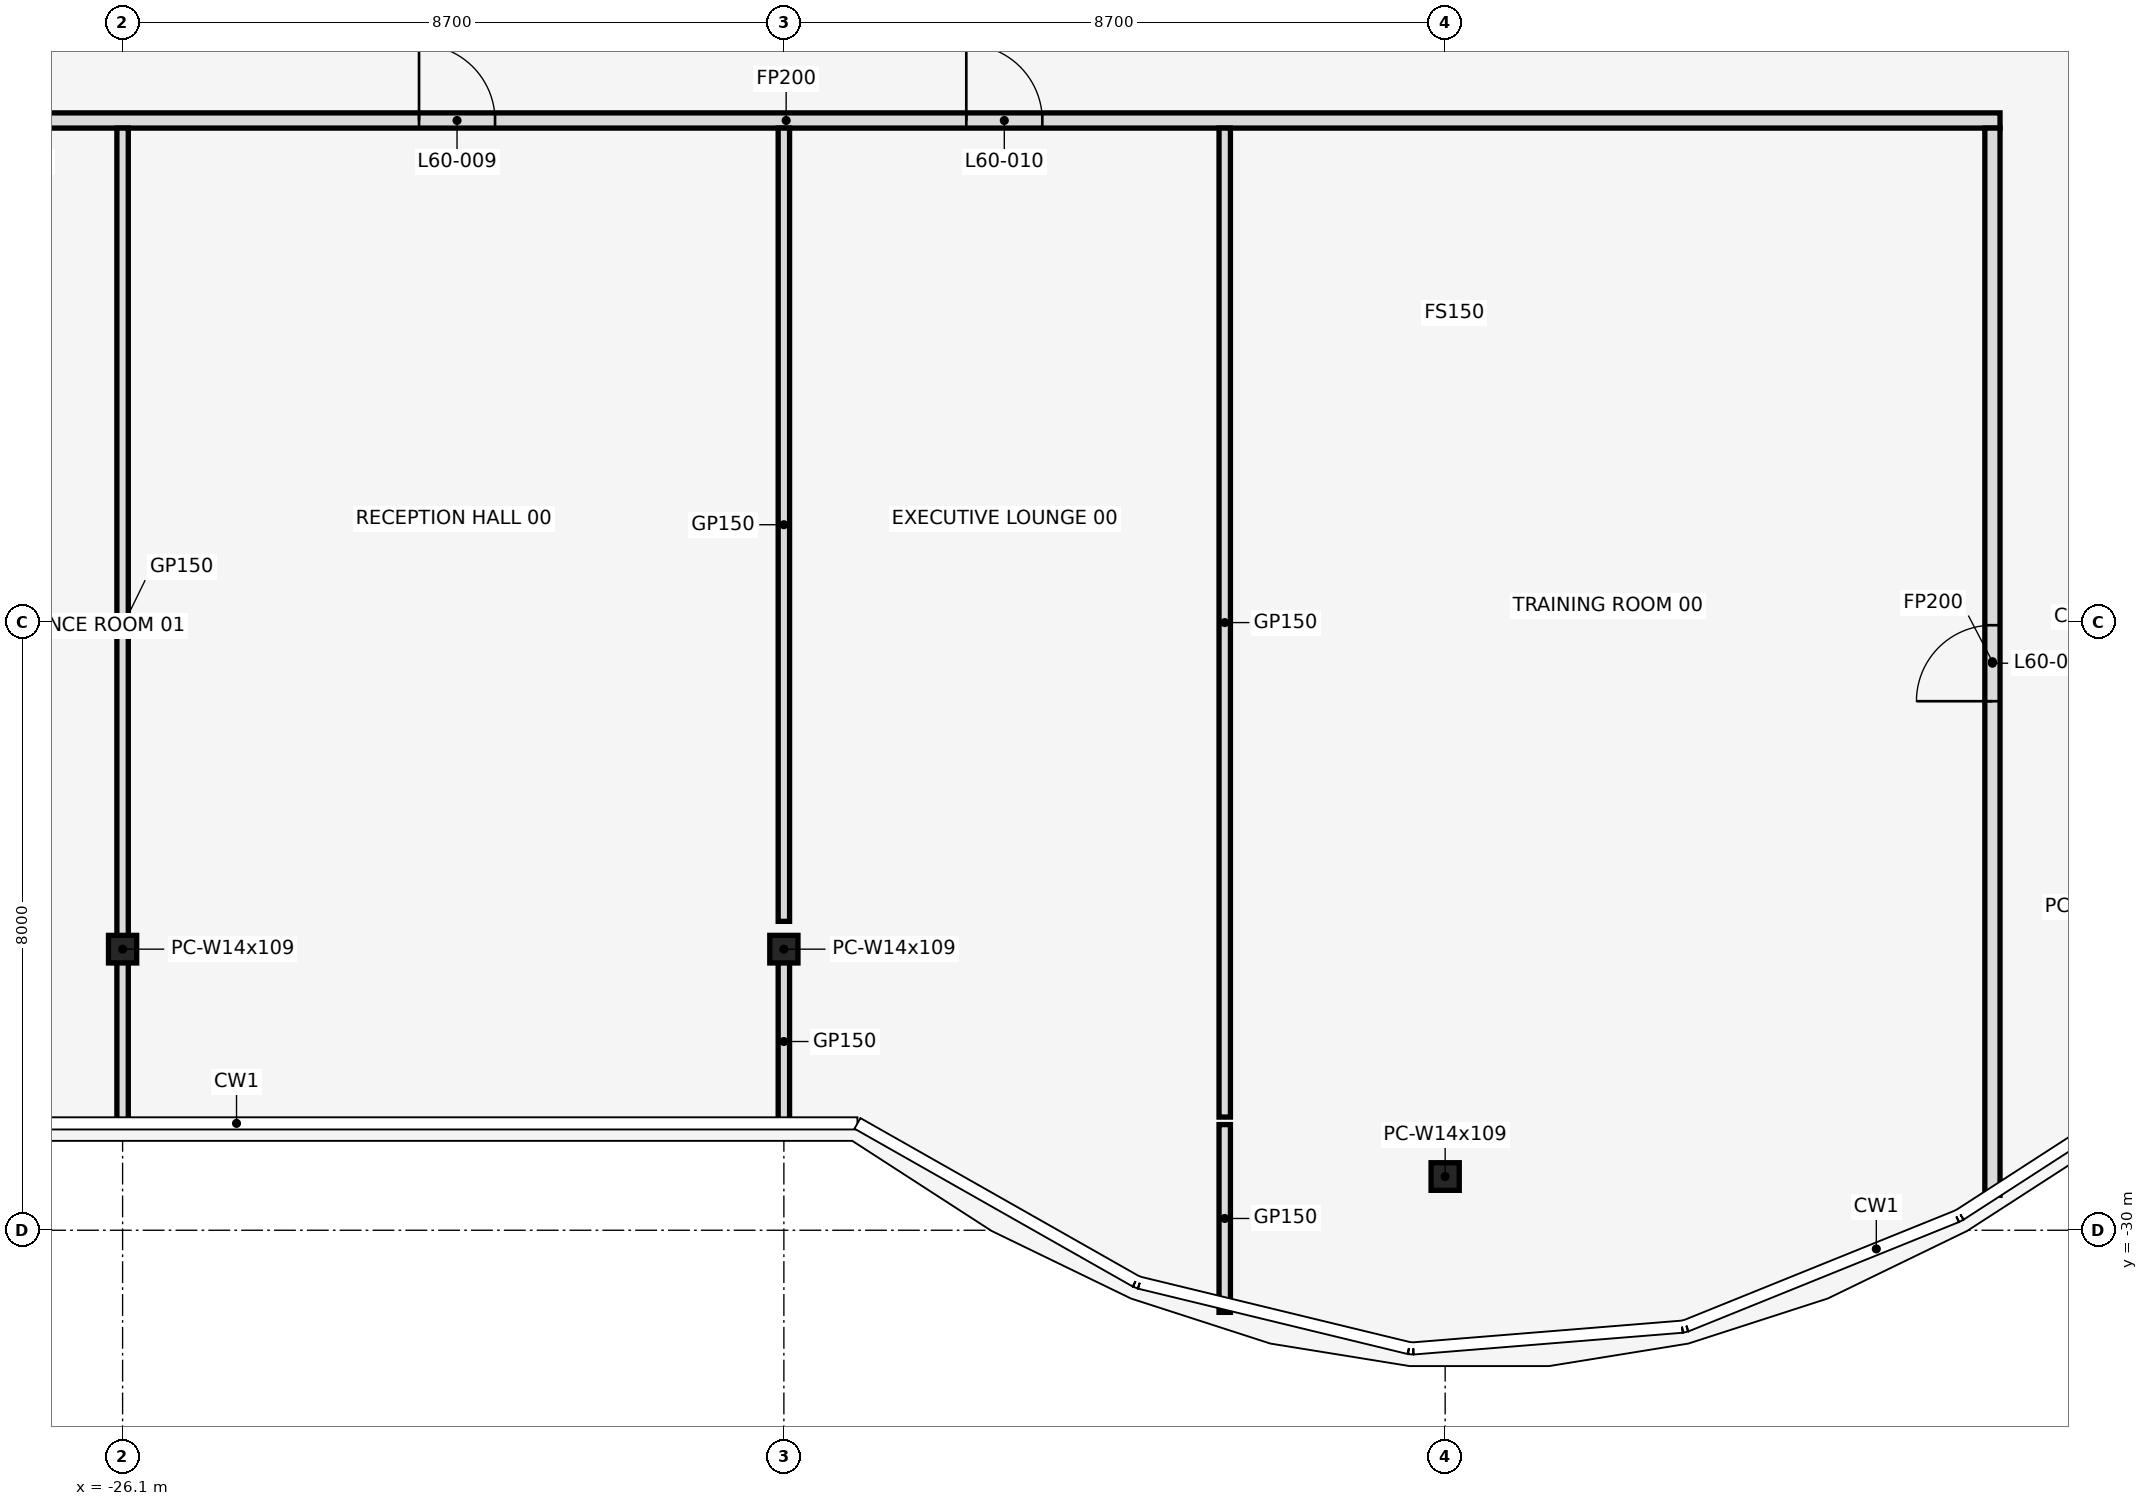
"""IFC4 building model, lengths in metres.
Left out: names, types, materials, properties, quantities, classifications, styles, units other than length and angle.
Written with IfcOpenShell. Run it as: python <this file> out.ifc"""

import sys

from ifc_helpers import new_model, si_unit, direction, frame, frame_2d, origin, origin_2d, place, context, subcontext, project, spatial, rectangle, i_section, extrude, element, fill, save


model = new_model("IFC4")
c1 = context("Model", 3, precision=1e-05, world=origin(), true_north=direction((0.0, 1.0)))
c2 = subcontext(c1, "Body", "Model", "MODEL_VIEW")
j1 = project(units=[si_unit("LENGTHUNIT", "METRE"), si_unit("PLANEANGLEUNIT", "RADIAN")], contexts=[c1])
p1 = place(None, origin())
s1 = spatial("IfcSite", under=j1, at=p1, CompositionType="ELEMENT")
p2 = place(p1, origin())
s2 = spatial("IfcBuilding", under=s1, at=p2, CompositionType="ELEMENT")
p3 = place(p2, frame((0.0, 0.0, 266.6)))
s3 = spatial("IfcBuildingStorey", under=s2, at=p3, CompositionType="ELEMENT", Elevation=266.6)
for number, where, z_axis, x_axis in (
    (1, (-26.1, -26.302, 0.0), (0.0, 0.0, 1.0), (1.0, 0.0, 0.0)),
    (2, (-17.4, -26.302, 0.0), (0.0, 0.0, 1.0), (1.0, 0.0, 0.0)),
    (3, (-8.7, -29.293, 0.0), (0.0, 0.0, 1.0), (1.0, 0.0, 0.0)),
):
    element("IfcColumn", number, at=place(p3, frame(where, z_axis=z_axis, x_axis=x_axis)), inside=s3, PredefinedType="COLUMN", context=c2, shape_type="SweptSolid", body=[
        extrude(i_section(OverallWidth=0.371, OverallDepth=0.363, WebThickness=0.013, FlangeThickness=0.022, at=origin_2d()), origin(), (0.0, 0.0, 1.0), 4.2),
    ])
p4 = place(p3, frame((-33.34, -15.4, 0.0), z_axis=(0.0, 0.0, 1.0), x_axis=(1.0, 0.0, 0.0)))
e4 = element("IfcWall", 4, at=p4, inside=s3, PredefinedType="PARTITIONING", context=c2, shape_type="SweptSolid", body=[
    extrude(rectangle(XDim=31.94, YDim=0.2, at=frame_2d((15.97, 0.0))), origin(), (0.0, 0.0, 1.0), 3.118),
])
p5 = place(p4, frame((1.7, 0.0, 0.0)))
e5 = element("IfcOpeningElement", 5, at=p5, cuts=e4, PredefinedType="OPENING", context=c2, shape_type="SweptSolid", body=[
    extrude(rectangle(XDim=1.0, YDim=2.1, at=frame_2d((0.5, 1.05))), frame((0.0, 0.112, 0.0), z_axis=(0.0, -1.0, 0.0), x_axis=(1.0, 0.0, 0.0)), (0.0, 0.0, 1.0), 0.224),
])
p6 = place(p4, frame((5.34, 0.0, 0.0)))
e6 = element("IfcOpeningElement", 6, at=p6, cuts=e4, PredefinedType="OPENING", context=c2, shape_type="SweptSolid", body=[
    extrude(rectangle(XDim=0.9, YDim=2.1, at=frame_2d((0.45, 1.05))), frame((0.0, 0.112, 0.0), z_axis=(0.0, -1.0, 0.0), x_axis=(1.0, 0.0, 0.0)), (0.0, 0.0, 1.0), 0.224),
])
p7 = place(p4, frame((11.14, 0.0, 0.0)))
e7 = element("IfcOpeningElement", 7, at=p7, cuts=e4, PredefinedType="OPENING", context=c2, shape_type="SweptSolid", body=[
    extrude(rectangle(XDim=1.0, YDim=2.1, at=frame_2d((0.5, 1.05))), frame((0.0, 0.112, 0.0), z_axis=(0.0, -1.0, 0.0), x_axis=(1.0, 0.0, 0.0)), (0.0, 0.0, 1.0), 0.224),
])
p8 = place(p4, frame((18.34, 0.0, 0.0)))
e8 = element("IfcOpeningElement", 8, at=p8, cuts=e4, PredefinedType="OPENING", context=c2, shape_type="SweptSolid", body=[
    extrude(rectangle(XDim=1.0, YDim=2.1, at=frame_2d((0.5, 1.05))), frame((0.0, 0.112, 0.0), z_axis=(0.0, -1.0, 0.0), x_axis=(1.0, 0.0, 0.0)), (0.0, 0.0, 1.0), 0.224),
])
p9 = place(p3, frame((-26.1, -28.61, 0.0), z_axis=(0.0, 0.0, 1.0), x_axis=(0.0, 1.0, 0.0)))
e9 = element("IfcWall", 9, at=p9, inside=s3, PredefinedType="PARTITIONING", context=c2, shape_type="SweptSolid", body=[
    extrude(rectangle(XDim=13.11, YDim=0.15, at=frame_2d((6.555, 0.0))), origin(), (0.0, 0.0, 1.0), 3.118),
])
p10 = place(p3, frame((-17.4, -28.61, 0.0), z_axis=(0.0, 0.0, 1.0), x_axis=(0.0, 1.0, 0.0)))
e10 = element("IfcWall", 10, at=p10, inside=s3, PredefinedType="PARTITIONING", context=c2, shape_type="SweptSolid", body=[
    extrude(rectangle(XDim=2.186, YDim=0.15, at=frame_2d((1.093, 0.0))), origin(), (0.0, 0.0, 1.0), 3.118),
])
p11 = place(p3, frame((-17.4, -25.936, 0.0), z_axis=(0.0, 0.0, 1.0), x_axis=(0.0, 1.0, 0.0)))
e11 = element("IfcWall", 11, at=p11, inside=s3, PredefinedType="PARTITIONING", context=c2, shape_type="SweptSolid", body=[
    extrude(rectangle(XDim=10.436, YDim=0.15, at=frame_2d((5.218, 0.0))), origin(), (0.0, 0.0, 1.0), 3.118),
])
p12 = place(p3, frame((-11.6, -31.08, 0.0), z_axis=(0.0, 0.0, 1.0), x_axis=(0.0, 1.0, 0.0)))
e12 = element("IfcWall", 12, at=p12, inside=s3, PredefinedType="PARTITIONING", context=c2, shape_type="SweptSolid", body=[
    extrude(rectangle(XDim=2.47, YDim=0.15, at=frame_2d((1.235, 0.0))), origin(), (0.0, 0.0, 1.0), 3.118),
])
p13 = place(p3, frame((-11.6, -28.511, 0.0), z_axis=(0.0, 0.0, 1.0), x_axis=(0.0, 1.0, 0.0)))
e13 = element("IfcWall", 13, at=p13, inside=s3, PredefinedType="PARTITIONING", context=c2, shape_type="SweptSolid", body=[
    extrude(rectangle(XDim=13.011, YDim=0.15, at=frame_2d((6.505, 0.0))), origin(), (0.0, 0.0, 1.0), 3.118),
])
p14 = place(p3, frame((-1.5, -29.54, 0.0), z_axis=(0.0, 0.0, 1.0), x_axis=(0.0, 1.0, 0.0)))
e14 = element("IfcWall", 14, at=p14, inside=s3, PredefinedType="PARTITIONING", context=c2, shape_type="SweptSolid", body=[
    extrude(rectangle(XDim=14.04, YDim=0.2, at=frame_2d((7.02, 0.0))), origin(), (0.0, 0.0, 1.0), 3.118),
])
p15 = place(p14, frame((6.5, 0.0, 0.0)))
e15 = element("IfcOpeningElement", 15, at=p15, cuts=e14, PredefinedType="OPENING", context=c2, shape_type="SweptSolid", body=[
    extrude(rectangle(XDim=1.0, YDim=2.1, at=frame_2d((0.5, 1.05))), frame((0.0, 0.112, 0.0), z_axis=(0.0, -1.0, 0.0), x_axis=(1.0, 0.0, 0.0)), (0.0, 0.0, 1.0), 0.224),
])
p16 = place(p7, frame((1.0, 0.0, 0.0), z_axis=(0.0, 0.0, 1.0), x_axis=(-1.0, 0.0, 0.0)))
e16 = element("IfcDoor", 16, at=p16, inside=s3, OperationType="SINGLE_SWING_RIGHT", PredefinedType="DOOR", context=c2, shape_type="SweptSolid", body=[
    extrude(rectangle(XDim=1.0, YDim=2.1, at=frame_2d((0.5, 1.05))), frame((0.0, 0.025, 0.0), z_axis=(0.0, -1.0, 0.0), x_axis=(1.0, 0.0, 0.0)), (0.0, 0.0, 1.0), 0.05),
])
fill(e7, e16)
p17 = place(p8, frame((1.0, 0.0, 0.0), z_axis=(0.0, 0.0, 1.0), x_axis=(-1.0, 0.0, 0.0)))
e17 = element("IfcDoor", 17, at=p17, inside=s3, OperationType="SINGLE_SWING_LEFT", PredefinedType="DOOR", context=c2, shape_type="SweptSolid", body=[
    extrude(rectangle(XDim=1.0, YDim=2.1, at=frame_2d((0.5, 1.05))), frame((0.0, 0.025, 0.0), z_axis=(0.0, -1.0, 0.0), x_axis=(1.0, 0.0, 0.0)), (0.0, 0.0, 1.0), 0.05),
])
fill(e8, e17)
p18 = place(p15, origin())
e18 = element("IfcDoor", 18, at=p18, inside=s3, OperationType="SINGLE_SWING_LEFT", PredefinedType="DOOR", context=c2, shape_type="SweptSolid", body=[
    extrude(rectangle(XDim=1.0, YDim=2.1, at=frame_2d((0.5, 1.05))), frame((0.0, 0.025, 0.0), z_axis=(0.0, -1.0, 0.0), x_axis=(1.0, 0.0, 0.0)), (0.0, 0.0, 1.0), 0.05),
])
fill(e15, e18)
save(model, sys.argv[1])
